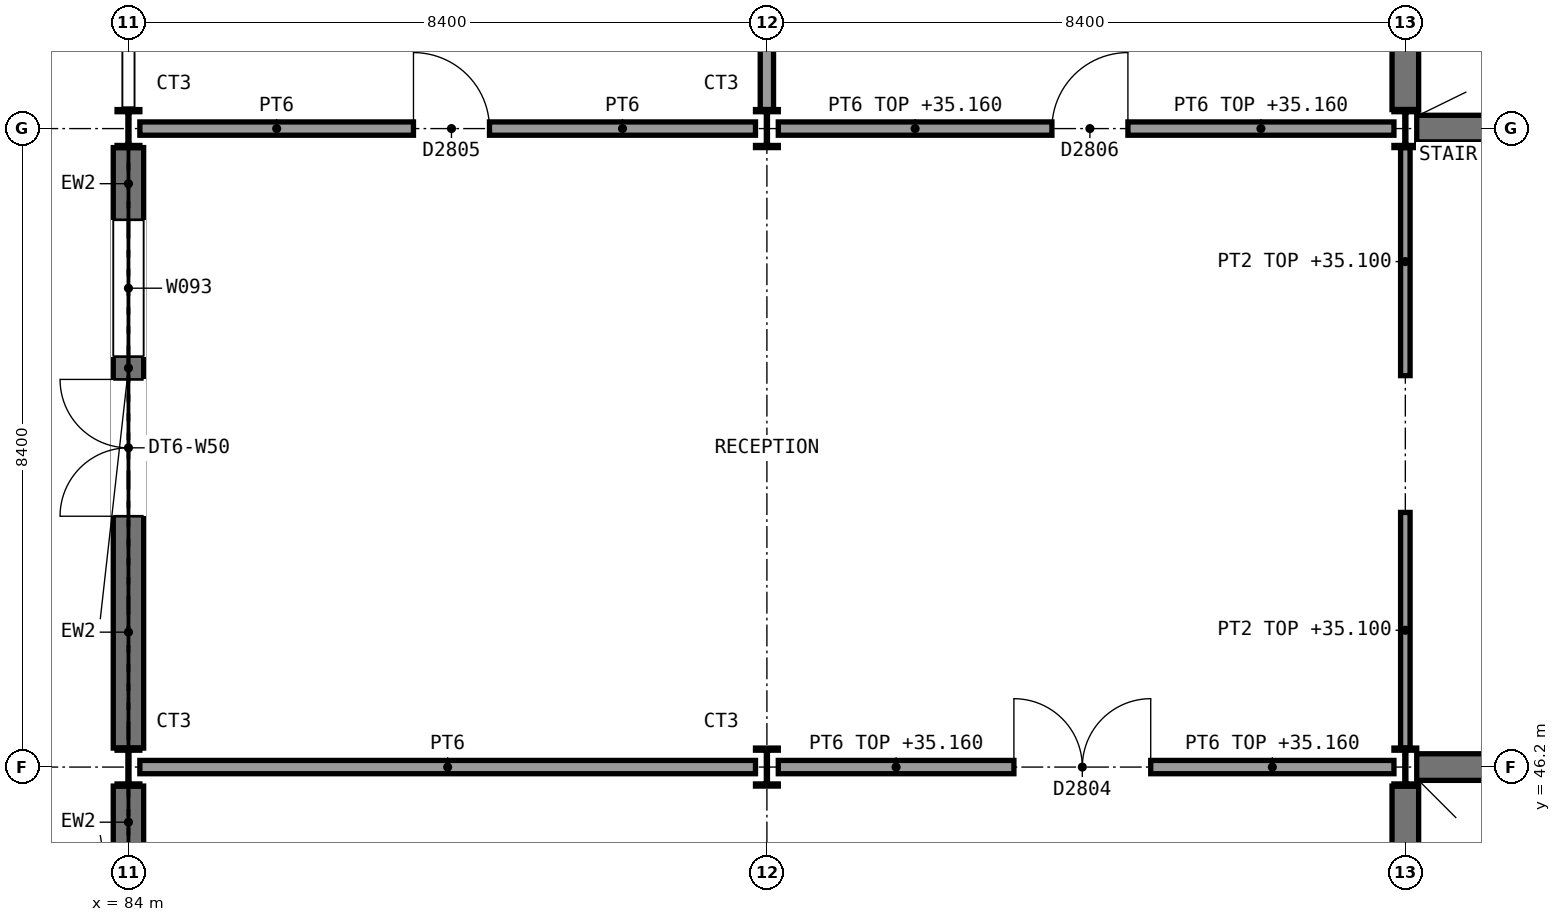
"""IFC4 building model, lengths in metres.
Left out: names, types, materials, properties, quantities, classifications, styles, units other than length and angle.
Written with IfcOpenShell. Run it as: python <this file> out.ifc"""

import sys

from ifc_helpers import new_model, si_unit, direction, frame, frame_2d, origin, origin_2d, place, context, subcontext, project, spatial, rectangle, i_section, extrude, element, fill, save


model = new_model("IFC4")
c1 = context("Model", 3, precision=1e-05, world=origin(), true_north=direction((0.0, 1.0)))
c2 = subcontext(c1, "Body", "Model", "MODEL_VIEW")
j1 = project(units=[si_unit("LENGTHUNIT", "METRE"), si_unit("PLANEANGLEUNIT", "RADIAN")], contexts=[c1])
p1 = place(None, origin())
s1 = spatial("IfcSite", under=j1, at=p1, CompositionType="ELEMENT")
p2 = place(p1, origin())
s2 = spatial("IfcBuilding", under=s1, at=p2, CompositionType="ELEMENT")
p3 = place(p2, frame((0.0, 0.0, 31.2)))
s3 = spatial("IfcBuildingStorey", under=s2, at=p3, CompositionType="ELEMENT", Elevation=31.2)
p4 = place(p3, frame((100.95, 54.6, 0.0), z_axis=(0.0, 0.0, 1.0), x_axis=(1.0, 0.0, 0.0)))
e1 = element("IfcWall", 1, at=p4, inside=s3, PredefinedType="SHEAR", context=c2, shape_type="SweptSolid", body=[
    extrude(rectangle(XDim=16.4, YDim=0.35, at=frame_2d((8.2, 0.0))), origin(), (0.0, 0.0, 1.0), 4.25),
])
p5 = place(p4, frame((1.15, 0.0, 0.0)))
e2 = element("IfcOpeningElement", 2, at=p5, cuts=e1, PredefinedType="OPENING", context=c2, shape_type="SweptSolid", body=[
    extrude(rectangle(XDim=1.8, YDim=2.1, at=frame_2d((0.9, 1.05))), frame((0.0, 0.185, 0.0), z_axis=(0.0, -1.0, 0.0), x_axis=(1.0, 0.0, 0.0)), (0.0, 0.0, 1.0), 0.37),
])
p6 = place(p4, frame((13.55, 0.0, 0.0)))
e3 = element("IfcOpeningElement", 3, at=p6, cuts=e1, PredefinedType="OPENING", context=c2, shape_type="SweptSolid", body=[
    extrude(rectangle(XDim=1.8, YDim=2.1, at=frame_2d((0.9, 1.05))), frame((0.0, 0.185, 0.0), z_axis=(0.0, -1.0, 0.0), x_axis=(1.0, 0.0, 0.0)), (0.0, 0.0, 1.0), 0.37),
])
p7 = place(p4, frame((7.05, 0.0, 0.0)))
e4 = element("IfcOpeningElement", 4, at=p7, cuts=e1, PredefinedType="OPENING", context=c2, shape_type="SweptSolid", body=[
    extrude(rectangle(XDim=2.4, YDim=2.4, at=frame_2d((1.2, 1.2))), frame((0.0, 0.185, 0.0), z_axis=(0.0, -1.0, 0.0), x_axis=(1.0, 0.0, 0.0)), (0.0, 0.0, 1.0), 0.37),
])
p8 = place(p3, frame((100.8, 54.85, 0.0), z_axis=(0.0, 0.0, 1.0), x_axis=(0.0, 1.0, 0.0)))
e5 = element("IfcWall", 5, at=p8, inside=s3, PredefinedType="SHEAR", context=c2, shape_type="SweptSolid", body=[
    extrude(rectangle(XDim=7.9, YDim=0.35, at=frame_2d((3.95, 0.0))), origin(), (0.0, 0.0, 1.0), 4.25),
])
p9 = place(p3, frame((100.95, 46.2, 0.0), z_axis=(0.0, 0.0, 1.0), x_axis=(1.0, 0.0, 0.0)))
e6 = element("IfcWall", 6, at=p9, inside=s3, PredefinedType="SHEAR", context=c2, shape_type="SweptSolid", body=[
    extrude(rectangle(XDim=8.1, YDim=0.35, at=frame_2d((4.05, 0.0))), origin(), (0.0, 0.0, 1.0), 4.25),
])
p10 = place(p9, frame((1.15, 0.0, 0.0)))
e7 = element("IfcOpeningElement", 7, at=p10, cuts=e6, PredefinedType="OPENING", context=c2, shape_type="SweptSolid", body=[
    extrude(rectangle(XDim=1.8, YDim=2.1, at=frame_2d((0.9, 1.05))), frame((0.0, 0.185, 0.0), z_axis=(0.0, -1.0, 0.0), x_axis=(1.0, 0.0, 0.0)), (0.0, 0.0, 1.0), 0.37),
])
p11 = place(p9, frame((5.6, 0.0, 0.0)))
e8 = element("IfcOpeningElement", 8, at=p11, cuts=e6, PredefinedType="OPENING", context=c2, shape_type="SweptSolid", body=[
    extrude(rectangle(XDim=1.2, YDim=2.1, at=frame_2d((0.6, 1.05))), frame((0.0, 0.185, 0.0), z_axis=(0.0, -1.0, 0.0), x_axis=(1.0, 0.0, 0.0)), (0.0, 0.0, 1.0), 0.37),
])
p12 = place(p3, frame((100.8, 38.05, 0.0), z_axis=(0.0, 0.0, 1.0), x_axis=(0.0, 1.0, 0.0)))
e9 = element("IfcWall", 9, at=p12, inside=s3, PredefinedType="SHEAR", context=c2, shape_type="SweptSolid", body=[
    extrude(rectangle(XDim=7.9, YDim=0.35, at=frame_2d((3.95, 0.0))), origin(), (0.0, 0.0, 1.0), 4.25),
])
for number, where, z_axis, x_axis in (
    (10, (84.0, 46.2, 0.0), (0.0, 0.0, 1.0), (1.0, 0.0, 0.0)),
    (11, (84.0, 54.6, 0.0), (0.0, 0.0, 1.0), (1.0, 0.0, 0.0)),
    (12, (92.4, 46.2, 0.0), (0.0, 0.0, 1.0), (1.0, 0.0, 0.0)),
    (13, (92.4, 54.6, 0.0), (0.0, 0.0, 1.0), (1.0, 0.0, 0.0)),
    (14, (100.8, 46.2, 0.0), (0.0, 0.0, 1.0), (1.0, 0.0, 0.0)),
    (15, (100.8, 54.6, 0.0), (0.0, 0.0, 1.0), (1.0, 0.0, 0.0)),
):
    element("IfcColumn", number, at=place(p3, frame(where, z_axis=z_axis, x_axis=x_axis)), inside=s3, PredefinedType="COLUMN", context=c2, shape_type="SweptSolid", body=[
        extrude(i_section(OverallWidth=0.3, OverallDepth=0.5, WebThickness=0.014, FlangeThickness=0.028, FilletRadius=0.027, at=origin_2d()), origin(), (0.0, 0.0, 1.0), 4.4),
    ])
p13 = place(p3, frame((84.15, 46.2, 0.0), z_axis=(0.0, 0.0, 1.0), x_axis=(1.0, 0.0, 0.0)))
e16 = element("IfcWall", 16, at=p13, inside=s3, PredefinedType="PARTITIONING", context=c2, shape_type="SweptSolid", body=[
    extrude(rectangle(XDim=8.1, YDim=0.175, at=frame_2d((4.05, 0.0))), origin(), (0.0, 0.0, 1.0), 3.9),
])
p14 = place(p3, frame((92.55, 46.2, 0.0), z_axis=(0.0, 0.0, 1.0), x_axis=(1.0, 0.0, 0.0)))
e17 = element("IfcWall", 17, at=p14, inside=s3, PredefinedType="PARTITIONING", context=c2, shape_type="SweptSolid", body=[
    extrude(rectangle(XDim=8.1, YDim=0.175, at=frame_2d((4.05, 0.0))), origin(), (0.0, 0.0, 1.0), 3.96),
])
p15 = place(p14, frame((3.1, 0.0, 0.0)))
e18 = element("IfcOpeningElement", 18, at=p15, cuts=e17, PredefinedType="OPENING", context=c2, shape_type="SweptSolid", body=[
    extrude(rectangle(XDim=1.8, YDim=2.1, at=frame_2d((0.9, 1.05))), frame((0.0, 0.098, 0.0), z_axis=(0.0, -1.0, 0.0), x_axis=(1.0, 0.0, 0.0)), (0.0, 0.0, 1.0), 0.195),
])
p16 = place(p3, frame((100.8, 46.45, 0.0), z_axis=(0.0, 0.0, 1.0), x_axis=(0.0, 1.0, 0.0)))
e19 = element("IfcWall", 19, at=p16, inside=s3, PredefinedType="PARTITIONING", context=c2, shape_type="SweptSolid", body=[
    extrude(rectangle(XDim=3.1, YDim=0.125, at=frame_2d((1.55, 0.0))), origin(), (0.0, 0.0, 1.0), 3.9),
])
p17 = place(p3, frame((100.8, 51.35, 0.0), z_axis=(0.0, 0.0, 1.0), x_axis=(0.0, 1.0, 0.0)))
e20 = element("IfcWall", 20, at=p17, inside=s3, PredefinedType="PARTITIONING", context=c2, shape_type="SweptSolid", body=[
    extrude(rectangle(XDim=3.0, YDim=0.125, at=frame_2d((1.5, 0.0))), origin(), (0.0, 0.0, 1.0), 3.9),
])
p18 = place(p3, frame((84.15, 54.6, 0.0), z_axis=(0.0, 0.0, 1.0), x_axis=(1.0, 0.0, 0.0)))
e21 = element("IfcWall", 21, at=p18, inside=s3, PredefinedType="PARTITIONING", context=c2, shape_type="SweptSolid", body=[
    extrude(rectangle(XDim=8.1, YDim=0.175, at=frame_2d((4.05, 0.0))), origin(), (0.0, 0.0, 1.0), 3.9),
])
p19 = place(p18, frame((3.6, 0.0, 0.0)))
e22 = element("IfcOpeningElement", 22, at=p19, cuts=e21, PredefinedType="OPENING", context=c2, shape_type="SweptSolid", body=[
    extrude(rectangle(XDim=1.0, YDim=2.1, at=frame_2d((0.5, 1.05))), frame((0.0, 0.098, 0.0), z_axis=(0.0, -1.0, 0.0), x_axis=(1.0, 0.0, 0.0)), (0.0, 0.0, 1.0), 0.195),
])
p20 = place(p3, frame((92.55, 54.6, 0.0), z_axis=(0.0, 0.0, 1.0), x_axis=(1.0, 0.0, 0.0)))
e23 = element("IfcWall", 23, at=p20, inside=s3, PredefinedType="PARTITIONING", context=c2, shape_type="SweptSolid", body=[
    extrude(rectangle(XDim=8.1, YDim=0.175, at=frame_2d((4.05, 0.0))), origin(), (0.0, 0.0, 1.0), 3.96),
])
p21 = place(p20, frame((3.6, 0.0, 0.0)))
e24 = element("IfcOpeningElement", 24, at=p21, cuts=e23, PredefinedType="OPENING", context=c2, shape_type="SweptSolid", body=[
    extrude(rectangle(XDim=1.0, YDim=2.1, at=frame_2d((0.5, 1.05))), frame((0.0, 0.098, 0.0), z_axis=(0.0, -1.0, 0.0), x_axis=(1.0, 0.0, 0.0)), (0.0, 0.0, 1.0), 0.195),
])
p22 = place(p3, frame((92.4, 54.85, 0.0), z_axis=(0.0, 0.0, 1.0), x_axis=(0.0, 1.0, 0.0)))
e25 = element("IfcWall", 25, at=p22, inside=s3, PredefinedType="PARTITIONING", context=c2, shape_type="SweptSolid", body=[
    extrude(rectangle(XDim=7.9, YDim=0.175, at=frame_2d((3.95, 0.0))), origin(), (0.0, 0.0, 1.0), 3.9),
])
p23 = place(p3, frame((84.0, 38.05, 0.0), z_axis=(0.0, 0.0, 1.0), x_axis=(0.0, 1.0, 0.0)))
e26 = element("IfcWall", 26, at=p23, inside=s3, PredefinedType="STANDARD", context=c2, shape_type="SweptSolid", body=[
    extrude(rectangle(XDim=7.9, YDim=0.4, at=frame_2d((3.95, 0.0))), origin(), (0.0, 0.0, 1.0), 4.25),
])
p24 = place(p23, frame((0.95, 0.0, 0.9)))
e27 = element("IfcOpeningElement", 27, at=p24, cuts=e26, PredefinedType="OPENING", context=c2, shape_type="SweptSolid", body=[
    extrude(rectangle(XDim=1.8, YDim=2.4, at=frame_2d((0.9, 1.2))), frame((0.0, 0.21, 0.0), z_axis=(0.0, -1.0, 0.0), x_axis=(1.0, 0.0, 0.0)), (0.0, 0.0, 1.0), 0.42),
])
p25 = place(p23, frame((5.15, 0.0, 0.9)))
e28 = element("IfcOpeningElement", 28, at=p25, cuts=e26, PredefinedType="OPENING", context=c2, shape_type="SweptSolid", body=[
    extrude(rectangle(XDim=1.8, YDim=2.4, at=frame_2d((0.9, 1.2))), frame((0.0, 0.21, 0.0), z_axis=(0.0, -1.0, 0.0), x_axis=(1.0, 0.0, 0.0)), (0.0, 0.0, 1.0), 0.42),
])
p26 = place(p23, frame((3.05, 0.0, 0.0)))
e29 = element("IfcOpeningElement", 29, at=p26, cuts=e26, PredefinedType="OPENING", context=c2, shape_type="SweptSolid", body=[
    extrude(rectangle(XDim=1.8, YDim=2.4, at=frame_2d((0.9, 1.2))), frame((0.0, 0.21, 0.0), z_axis=(0.0, -1.0, 0.0), x_axis=(1.0, 0.0, 0.0)), (0.0, 0.0, 1.0), 0.42),
])
p27 = place(p3, frame((84.0, 46.45, 0.0), z_axis=(0.0, 0.0, 1.0), x_axis=(0.0, 1.0, 0.0)))
e30 = element("IfcWall", 30, at=p27, inside=s3, PredefinedType="STANDARD", context=c2, shape_type="SweptSolid", body=[
    extrude(rectangle(XDim=7.9, YDim=0.4, at=frame_2d((3.95, 0.0))), origin(), (0.0, 0.0, 1.0), 4.25),
])
p28 = place(p27, frame((5.15, 0.0, 0.9)))
e31 = element("IfcOpeningElement", 31, at=p28, cuts=e30, PredefinedType="OPENING", context=c2, shape_type="SweptSolid", body=[
    extrude(rectangle(XDim=1.8, YDim=2.4, at=frame_2d((0.9, 1.2))), frame((0.0, 0.21, 0.0), z_axis=(0.0, -1.0, 0.0), x_axis=(1.0, 0.0, 0.0)), (0.0, 0.0, 1.0), 0.42),
])
p29 = place(p27, frame((3.05, 0.0, 0.0)))
e32 = element("IfcOpeningElement", 32, at=p29, cuts=e30, PredefinedType="OPENING", context=c2, shape_type="SweptSolid", body=[
    extrude(rectangle(XDim=1.8, YDim=2.4, at=frame_2d((0.9, 1.2))), frame((0.0, 0.21, 0.0), z_axis=(0.0, -1.0, 0.0), x_axis=(1.0, 0.0, 0.0)), (0.0, 0.0, 1.0), 0.42),
])
p30 = place(p15, origin())
e33 = element("IfcDoor", 33, at=p30, inside=s3, OperationType="DOUBLE_DOOR_SINGLE_SWING", PredefinedType="DOOR", context=c2, shape_type="SweptSolid", body=[
    extrude(rectangle(XDim=1.8, YDim=2.1, at=frame_2d((0.9, 1.05))), frame((0.0, 0.025, 0.0), z_axis=(0.0, -1.0, 0.0), x_axis=(1.0, 0.0, 0.0)), (0.0, 0.0, 1.0), 0.05),
])
fill(e18, e33)
p31 = place(p19, origin())
e34 = element("IfcDoor", 34, at=p31, inside=s3, OperationType="SINGLE_SWING_LEFT", PredefinedType="DOOR", context=c2, shape_type="SweptSolid", body=[
    extrude(rectangle(XDim=1.0, YDim=2.1, at=frame_2d((0.5, 1.05))), frame((0.0, 0.025, 0.0), z_axis=(0.0, -1.0, 0.0), x_axis=(1.0, 0.0, 0.0)), (0.0, 0.0, 1.0), 0.05),
])
fill(e22, e34)
p32 = place(p21, origin())
e35 = element("IfcDoor", 35, at=p32, inside=s3, OperationType="SINGLE_SWING_RIGHT", PredefinedType="DOOR", context=c2, shape_type="SweptSolid", body=[
    extrude(rectangle(XDim=1.0, YDim=2.1, at=frame_2d((0.5, 1.05))), frame((0.0, 0.025, 0.0), z_axis=(0.0, -1.0, 0.0), x_axis=(1.0, 0.0, 0.0)), (0.0, 0.0, 1.0), 0.05),
])
fill(e24, e35)
p33 = place(p28, origin())
e36 = element("IfcWindow", 36, at=p33, inside=s3, PartitioningType="SINGLE_PANEL", PredefinedType="WINDOW", context=c2, shape_type="SweptSolid", body=[
    extrude(rectangle(XDim=1.8, YDim=2.4, at=frame_2d((0.9, 1.2))), frame((0.0, 0.03, 0.0), z_axis=(0.0, -1.0, 0.0), x_axis=(1.0, 0.0, 0.0)), (0.0, 0.0, 1.0), 0.06),
])
fill(e31, e36)
p34 = place(p29, origin())
e37 = element("IfcDoor", 37, at=p34, inside=s3, OperationType="DOUBLE_DOOR_SINGLE_SWING", PredefinedType="DOOR", context=c2, shape_type="SweptSolid", body=[
    extrude(rectangle(XDim=1.8, YDim=2.4, at=frame_2d((0.9, 1.2))), frame((0.0, 0.025, 0.0), z_axis=(0.0, -1.0, 0.0), x_axis=(1.0, 0.0, 0.0)), (0.0, 0.0, 1.0), 0.05),
])
fill(e32, e37)
save(model, sys.argv[1])
